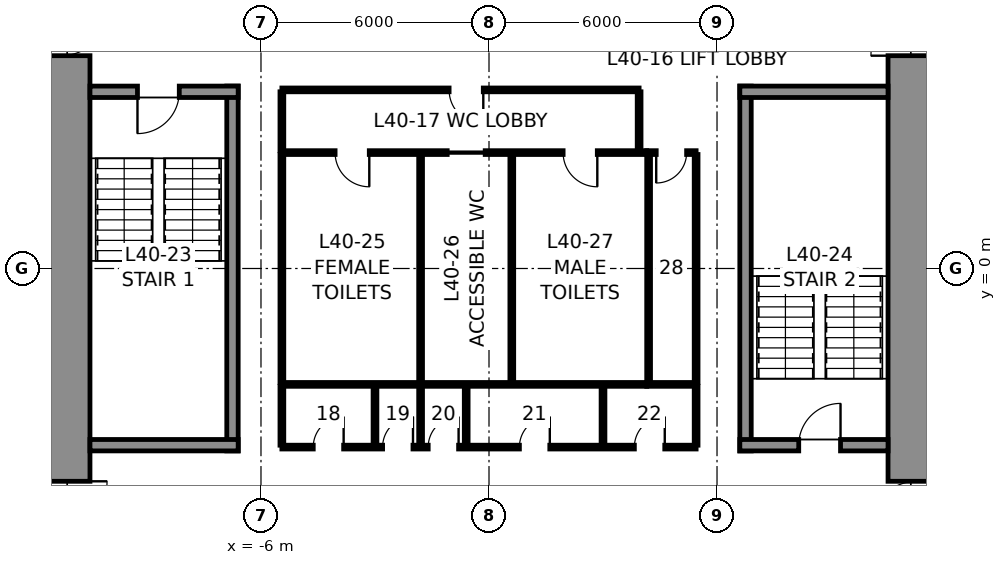
"""IFC4 building model, lengths in metres.
Left out: names, types, materials, properties, quantities, classifications, styles, units other than length and angle.
Written with IfcOpenShell. Run it as: python <this file> out.ifc"""

import sys

from ifc_helpers import new_model, si_unit, direction, frame, frame_2d, origin, place, context, subcontext, project, spatial, rectangle, extrude, element, fill, save


model = new_model("IFC4")
c1 = context("Model", 3, precision=1e-05, world=origin(), true_north=direction((0.0, 1.0)))
c2 = subcontext(c1, "Body", "Model", "MODEL_VIEW")
j1 = project(units=[si_unit("LENGTHUNIT", "METRE"), si_unit("PLANEANGLEUNIT", "RADIAN")], contexts=[c1])
p1 = place(None, origin())
s1 = spatial("IfcSite", under=j1, at=p1, CompositionType="ELEMENT")
p2 = place(p1, origin())
s2 = spatial("IfcBuilding", under=s1, at=p2, CompositionType="ELEMENT")
p3 = place(p2, frame((0.0, 0.0, 187.8)))
s3 = spatial("IfcBuildingStorey", under=s2, at=p3, CompositionType="ELEMENT", Elevation=187.8)
p4 = place(p3, frame((11.25, 10.5, 0.0), z_axis=(0.0, 0.0, 1.0), x_axis=(0.0, -1.0, 0.0)))
e1 = element("IfcWall", 1, at=p4, inside=s3, PredefinedType="SHEAR", context=c2, shape_type="SweptSolid", body=[
    extrude(rectangle(XDim=21.0, YDim=1.5, at=frame_2d((10.5, 0.0))), origin(), (0.0, 0.0, 1.0), 4.0),
])
p5 = place(p4, frame((3.7, 0.0, 0.0)))
e2 = element("IfcOpeningElement", 2, at=p5, cuts=e1, PredefinedType="OPENING", context=c2, shape_type="SweptSolid", body=[
    extrude(rectangle(XDim=1.2, YDim=2.3, at=frame_2d((0.6, 1.15))), frame((0.0, 0.76, 0.0), z_axis=(0.0, -1.0, 0.0), x_axis=(1.0, 0.0, 0.0)), (0.0, 0.0, 1.0), 1.52),
])
p6 = place(p4, frame((16.1, 0.0, 0.0)))
e3 = element("IfcOpeningElement", 3, at=p6, cuts=e1, PredefinedType="OPENING", context=c2, shape_type="SweptSolid", body=[
    extrude(rectangle(XDim=1.2, YDim=2.3, at=frame_2d((0.6, 1.15))), frame((0.0, 0.76, 0.0), z_axis=(0.0, -1.0, 0.0), x_axis=(1.0, 0.0, 0.0)), (0.0, 0.0, 1.0), 1.52),
])
p7 = place(p3, frame((-11.25, -10.5, 0.0), z_axis=(0.0, 0.0, 1.0), x_axis=(0.0, 1.0, 0.0)))
e4 = element("IfcWall", 4, at=p7, inside=s3, PredefinedType="SHEAR", context=c2, shape_type="SweptSolid", body=[
    extrude(rectangle(XDim=21.0, YDim=1.5, at=frame_2d((10.5, 0.0))), origin(), (0.0, 0.0, 1.0), 4.0),
])
p8 = place(p7, frame((16.1, 0.0, 0.0)))
e5 = element("IfcOpeningElement", 5, at=p8, cuts=e4, PredefinedType="OPENING", context=c2, shape_type="SweptSolid", body=[
    extrude(rectangle(XDim=1.2, YDim=2.3, at=frame_2d((0.6, 1.15))), frame((0.0, 0.76, 0.0), z_axis=(0.0, -1.0, 0.0), x_axis=(1.0, 0.0, 0.0)), (0.0, 0.0, 1.0), 1.52),
])
p9 = place(p7, frame((3.7, 0.0, 0.0)))
e6 = element("IfcOpeningElement", 6, at=p9, cuts=e4, PredefinedType="OPENING", context=c2, shape_type="SweptSolid", body=[
    extrude(rectangle(XDim=1.2, YDim=2.3, at=frame_2d((0.6, 1.15))), frame((0.0, 0.76, 0.0), z_axis=(0.0, -1.0, 0.0), x_axis=(1.0, 0.0, 0.0)), (0.0, 0.0, 1.0), 1.52),
])
p10 = place(p3, frame((-6.75, -4.8, 0.0), z_axis=(0.0, 0.0, 1.0), x_axis=(0.0, 1.0, 0.0)))
e7 = element("IfcWall", 7, at=p10, inside=s3, PredefinedType="SOLIDWALL", context=c2, shape_type="SweptSolid", body=[
    extrude(rectangle(XDim=9.6, YDim=0.3, at=frame_2d((4.8, 0.0))), origin(), (0.0, 0.0, 1.0), 3.75),
])
p11 = place(p3, frame((-10.5, 4.65, 0.0), z_axis=(0.0, 0.0, 1.0), x_axis=(1.0, 0.0, 0.0)))
e8 = element("IfcWall", 8, at=p11, inside=s3, PredefinedType="SOLIDWALL", context=c2, shape_type="SweptSolid", body=[
    extrude(rectangle(XDim=3.9, YDim=0.3, at=frame_2d((1.95, 0.0))), origin(), (0.0, 0.0, 1.0), 3.75),
])
p12 = place(p11, frame((1.25, 0.0, 0.0)))
e9 = element("IfcOpeningElement", 9, at=p12, cuts=e8, PredefinedType="OPENING", context=c2, shape_type="SweptSolid", body=[
    extrude(rectangle(XDim=1.1, YDim=2.3, at=frame_2d((0.55, 1.15))), frame((0.0, 0.16, 0.0), z_axis=(0.0, -1.0, 0.0), x_axis=(1.0, 0.0, 0.0)), (0.0, 0.0, 1.0), 0.32),
])
p13 = place(p3, frame((-6.6, -4.65, 0.0), z_axis=(0.0, 0.0, 1.0), x_axis=(-1.0, 0.0, 0.0)))
e10 = element("IfcWall", 10, at=p13, inside=s3, PredefinedType="SOLIDWALL", context=c2, shape_type="SweptSolid", body=[
    extrude(rectangle(XDim=3.9, YDim=0.3, at=frame_2d((1.95, 0.0))), origin(), (0.0, 0.0, 1.0), 3.75),
])
p14 = place(p3, frame((6.75, -4.8, 0.0), z_axis=(0.0, 0.0, 1.0), x_axis=(0.0, 1.0, 0.0)))
e11 = element("IfcWall", 11, at=p14, inside=s3, PredefinedType="SOLIDWALL", context=c2, shape_type="SweptSolid", body=[
    extrude(rectangle(XDim=9.6, YDim=0.3, at=frame_2d((4.8, 0.0))), origin(), (0.0, 0.0, 1.0), 3.75),
])
p15 = place(p3, frame((6.6, 4.65, 0.0), z_axis=(0.0, 0.0, 1.0), x_axis=(1.0, 0.0, 0.0)))
e12 = element("IfcWall", 12, at=p15, inside=s3, PredefinedType="SOLIDWALL", context=c2, shape_type="SweptSolid", body=[
    extrude(rectangle(XDim=3.9, YDim=0.3, at=frame_2d((1.95, 0.0))), origin(), (0.0, 0.0, 1.0), 3.75),
])
p16 = place(p3, frame((10.5, -4.65, 0.0), z_axis=(0.0, 0.0, 1.0), x_axis=(-1.0, 0.0, 0.0)))
e13 = element("IfcWall", 13, at=p16, inside=s3, PredefinedType="SOLIDWALL", context=c2, shape_type="SweptSolid", body=[
    extrude(rectangle(XDim=3.9, YDim=0.3, at=frame_2d((1.95, 0.0))), origin(), (0.0, 0.0, 1.0), 3.75),
])
p17 = place(p16, frame((1.25, 0.0, 0.0)))
e14 = element("IfcOpeningElement", 14, at=p17, cuts=e13, PredefinedType="OPENING", context=c2, shape_type="SweptSolid", body=[
    extrude(rectangle(XDim=1.1, YDim=2.3, at=frame_2d((0.55, 1.15))), frame((0.0, 0.16, 0.0), z_axis=(0.0, -1.0, 0.0), x_axis=(1.0, 0.0, 0.0)), (0.0, 0.0, 1.0), 0.32),
])
p18 = place(p3, frame((-5.45, 3.05, 0.0), z_axis=(0.0, 0.0, 1.0), x_axis=(1.0, 0.0, 0.0)))
e15 = element("IfcWall", 15, at=p18, inside=s3, PredefinedType="PARTITIONING", context=c2, shape_type="SweptSolid", body=[
    extrude(rectangle(XDim=9.6, YDim=0.1, at=frame_2d((4.8, 0.0))), origin(), (0.0, 0.0, 1.0), 3.75),
])
p19 = place(p18, frame((1.4, 0.0, 0.0)))
e16 = element("IfcOpeningElement", 16, at=p19, cuts=e15, PredefinedType="OPENING", context=c2, shape_type="SweptSolid", body=[
    extrude(rectangle(XDim=0.9, YDim=2.3, at=frame_2d((0.45, 1.15))), frame((0.0, 0.06, 0.0), z_axis=(0.0, -1.0, 0.0), x_axis=(1.0, 0.0, 0.0)), (0.0, 0.0, 1.0), 0.12),
])
p20 = place(p18, frame((4.35, 0.0, 0.0)))
e17 = element("IfcOpeningElement", 17, at=p20, cuts=e15, PredefinedType="OPENING", context=c2, shape_type="SweptSolid", body=[
    extrude(rectangle(XDim=1.0, YDim=2.3, at=frame_2d((0.5, 1.15))), frame((0.0, 0.06, 0.0), z_axis=(0.0, -1.0, 0.0), x_axis=(1.0, 0.0, 0.0)), (0.0, 0.0, 1.0), 0.12),
])
p21 = place(p18, frame((7.4, 0.0, 0.0)))
e18 = element("IfcOpeningElement", 18, at=p21, cuts=e15, PredefinedType="OPENING", context=c2, shape_type="SweptSolid", body=[
    extrude(rectangle(XDim=0.9, YDim=2.3, at=frame_2d((0.45, 1.15))), frame((0.0, 0.06, 0.0), z_axis=(0.0, -1.0, 0.0), x_axis=(1.0, 0.0, 0.0)), (0.0, 0.0, 1.0), 0.12),
])
p22 = place(p3, frame((4.15, 3.05, 0.0), z_axis=(0.0, 0.0, 1.0), x_axis=(1.0, 0.0, 0.0)))
e19 = element("IfcWall", 19, at=p22, inside=s3, PredefinedType="PARTITIONING", context=c2, shape_type="SweptSolid", body=[
    extrude(rectangle(XDim=1.3, YDim=0.1, at=frame_2d((0.65, 0.0))), origin(), (0.0, 0.0, 1.0), 3.75),
])
p23 = place(p22, frame((0.25, 0.0, 0.0)))
e20 = element("IfcOpeningElement", 20, at=p23, cuts=e19, PredefinedType="OPENING", context=c2, shape_type="SweptSolid", body=[
    extrude(rectangle(XDim=0.8, YDim=2.3, at=frame_2d((0.4, 1.15))), frame((0.0, 0.06, 0.0), z_axis=(0.0, -1.0, 0.0), x_axis=(1.0, 0.0, 0.0)), (0.0, 0.0, 1.0), 0.12),
])
p24 = place(p3, frame((4.15, -3.05, 0.0), z_axis=(0.0, 0.0, 1.0), x_axis=(-1.0, 0.0, 0.0)))
e21 = element("IfcWall", 21, at=p24, inside=s3, PredefinedType="PARTITIONING", context=c2, shape_type="SweptSolid", body=[
    extrude(rectangle(XDim=9.6, YDim=0.1, at=frame_2d((4.8, 0.0))), origin(), (0.0, 0.0, 1.0), 3.75),
])
p25 = place(p3, frame((5.45, -3.05, 0.0), z_axis=(0.0, 0.0, 1.0), x_axis=(-1.0, 0.0, 0.0)))
e22 = element("IfcWall", 22, at=p25, inside=s3, PredefinedType="PARTITIONING", context=c2, shape_type="SweptSolid", body=[
    extrude(rectangle(XDim=1.3, YDim=0.1, at=frame_2d((0.65, 0.0))), origin(), (0.0, 0.0, 1.0), 3.75),
])
for number, where, z_axis, x_axis in (
    (23, (5.45, 3.0, 0.0), (0.0, 0.0, 1.0), (0.0, -1.0, 0.0)),
    (24, (-5.45, -3.0, 0.0), (0.0, 0.0, 1.0), (0.0, 1.0, 0.0)),
    (25, (-1.8, -3.0, 0.0), (0.0, 0.0, 1.0), (0.0, 1.0, 0.0)),
    (26, (0.6, -3.0, 0.0), (0.0, 0.0, 1.0), (0.0, 1.0, 0.0)),
    (27, (4.2, -3.0, 0.0), (0.0, 0.0, 1.0), (0.0, 1.0, 0.0)),
):
    element("IfcWall", number, at=place(p3, frame(where, z_axis=z_axis, x_axis=x_axis)), inside=s3, PredefinedType="PARTITIONING", context=c2, shape_type="SweptSolid", body=[
        extrude(rectangle(XDim=6.0, YDim=0.1, at=frame_2d((3.0, 0.0))), origin(), (0.0, 0.0, 1.0), 3.75),
    ])
p26 = place(p3, frame((-5.45, 4.7, 0.0), z_axis=(0.0, 0.0, 1.0), x_axis=(1.0, 0.0, 0.0)))
e28 = element("IfcWall", 28, at=p26, inside=s3, PredefinedType="PARTITIONING", context=c2, shape_type="SweptSolid", body=[
    extrude(rectangle(XDim=9.4, YDim=0.1, at=frame_2d((4.7, 0.0))), origin(), (0.0, 0.0, 1.0), 3.75),
])
p27 = place(p26, frame((4.4, 0.0, 0.0)))
e29 = element("IfcOpeningElement", 29, at=p27, cuts=e28, PredefinedType="OPENING", context=c2, shape_type="SweptSolid", body=[
    extrude(rectangle(XDim=0.9, YDim=2.3, at=frame_2d((0.45, 1.15))), frame((0.0, 0.06, 0.0), z_axis=(0.0, -1.0, 0.0), x_axis=(1.0, 0.0, 0.0)), (0.0, 0.0, 1.0), 0.12),
])
for number, where, z_axis, x_axis in (
    (30, (-5.45, 3.1, 0.0), (0.0, 0.0, 1.0), (0.0, 1.0, 0.0)),
    (31, (3.95, 3.1, 0.0), (0.0, 0.0, 1.0), (0.0, 1.0, 0.0)),
):
    element("IfcWall", number, at=place(p3, frame(where, z_axis=z_axis, x_axis=x_axis)), inside=s3, PredefinedType="PARTITIONING", context=c2, shape_type="SweptSolid", body=[
        extrude(rectangle(XDim=1.55, YDim=0.1, at=frame_2d((0.775, 0.0))), origin(), (0.0, 0.0, 1.0), 3.75),
    ])
p28 = place(p3, frame((5.45, -4.7, 0.0), z_axis=(0.0, 0.0, 1.0), x_axis=(-1.0, 0.0, 0.0)))
e32 = element("IfcWall", 32, at=p28, inside=s3, PredefinedType="PARTITIONING", context=c2, shape_type="SweptSolid", body=[
    extrude(rectangle(XDim=10.9, YDim=0.1, at=frame_2d((5.45, 0.0))), origin(), (0.0, 0.0, 1.0), 3.75),
])
p29 = place(p28, frame((9.275, 0.0, 0.0)))
e33 = element("IfcOpeningElement", 33, at=p29, cuts=e32, PredefinedType="OPENING", context=c2, shape_type="SweptSolid", body=[
    extrude(rectangle(XDim=0.8, YDim=2.3, at=frame_2d((0.4, 1.15))), frame((0.0, 0.06, 0.0), z_axis=(0.0, -1.0, 0.0), x_axis=(1.0, 0.0, 0.0)), (0.0, 0.0, 1.0), 0.12),
])
p30 = place(p28, frame((7.45, 0.0, 0.0)))
e34 = element("IfcOpeningElement", 34, at=p30, cuts=e32, PredefinedType="OPENING", context=c2, shape_type="SweptSolid", body=[
    extrude(rectangle(XDim=0.8, YDim=2.3, at=frame_2d((0.4, 1.15))), frame((0.0, 0.06, 0.0), z_axis=(0.0, -1.0, 0.0), x_axis=(1.0, 0.0, 0.0)), (0.0, 0.0, 1.0), 0.12),
])
p31 = place(p28, frame((6.25, 0.0, 0.0)))
e35 = element("IfcOpeningElement", 35, at=p31, cuts=e32, PredefinedType="OPENING", context=c2, shape_type="SweptSolid", body=[
    extrude(rectangle(XDim=0.8, YDim=2.3, at=frame_2d((0.4, 1.15))), frame((0.0, 0.06, 0.0), z_axis=(0.0, -1.0, 0.0), x_axis=(1.0, 0.0, 0.0)), (0.0, 0.0, 1.0), 0.12),
])
p32 = place(p28, frame((3.85, 0.0, 0.0)))
e36 = element("IfcOpeningElement", 36, at=p32, cuts=e32, PredefinedType="OPENING", context=c2, shape_type="SweptSolid", body=[
    extrude(rectangle(XDim=0.8, YDim=2.3, at=frame_2d((0.4, 1.15))), frame((0.0, 0.06, 0.0), z_axis=(0.0, -1.0, 0.0), x_axis=(1.0, 0.0, 0.0)), (0.0, 0.0, 1.0), 0.12),
])
p33 = place(p28, frame((0.825, 0.0, 0.0)))
e37 = element("IfcOpeningElement", 37, at=p33, cuts=e32, PredefinedType="OPENING", context=c2, shape_type="SweptSolid", body=[
    extrude(rectangle(XDim=0.8, YDim=2.3, at=frame_2d((0.4, 1.15))), frame((0.0, 0.06, 0.0), z_axis=(0.0, -1.0, 0.0), x_axis=(1.0, 0.0, 0.0)), (0.0, 0.0, 1.0), 0.12),
])
for number, where, z_axis, x_axis in (
    (38, (-5.45, -3.1, 0.0), (0.0, 0.0, 1.0), (0.0, -1.0, 0.0)),
    (39, (5.45, -3.1, 0.0), (0.0, 0.0, 1.0), (0.0, -1.0, 0.0)),
    (40, (-3.0, -3.1, 0.0), (0.0, 0.0, 1.0), (0.0, -1.0, 0.0)),
    (41, (-1.8, -3.1, 0.0), (0.0, 0.0, 1.0), (0.0, -1.0, 0.0)),
    (42, (-0.6, -3.1, 0.0), (0.0, 0.0, 1.0), (0.0, -1.0, 0.0)),
    (43, (3.0, -3.1, 0.0), (0.0, 0.0, 1.0), (0.0, -1.0, 0.0)),
):
    element("IfcWall", number, at=place(p3, frame(where, z_axis=z_axis, x_axis=x_axis)), inside=s3, PredefinedType="PARTITIONING", context=c2, shape_type="SweptSolid", body=[
        extrude(rectangle(XDim=1.55, YDim=0.1, at=frame_2d((0.775, 0.0))), origin(), (0.0, 0.0, 1.0), 3.75),
    ])
p34 = place(p12, frame((1.1, 0.0, 0.0), z_axis=(0.0, 0.0, 1.0), x_axis=(-1.0, 0.0, 0.0)))
e44 = element("IfcDoor", 44, at=p34, inside=s3, OperationType="SINGLE_SWING_RIGHT", PredefinedType="DOOR", context=c2, shape_type="SweptSolid", body=[
    extrude(rectangle(XDim=1.1, YDim=2.3, at=frame_2d((0.55, 1.15))), frame((0.0, 0.025, 0.0), z_axis=(0.0, -1.0, 0.0), x_axis=(1.0, 0.0, 0.0)), (0.0, 0.0, 1.0), 0.05),
])
fill(e9, e44)
p35 = place(p17, frame((1.1, 0.0, 0.0), z_axis=(0.0, 0.0, 1.0), x_axis=(-1.0, 0.0, 0.0)))
e45 = element("IfcDoor", 45, at=p35, inside=s3, OperationType="SINGLE_SWING_RIGHT", PredefinedType="DOOR", context=c2, shape_type="SweptSolid", body=[
    extrude(rectangle(XDim=1.1, YDim=2.3, at=frame_2d((0.55, 1.15))), frame((0.0, 0.025, 0.0), z_axis=(0.0, -1.0, 0.0), x_axis=(1.0, 0.0, 0.0)), (0.0, 0.0, 1.0), 0.05),
])
fill(e14, e45)
p36 = place(p19, frame((0.9, 0.0, 0.0), z_axis=(0.0, 0.0, 1.0), x_axis=(-1.0, 0.0, 0.0)))
e46 = element("IfcDoor", 46, at=p36, inside=s3, OperationType="SINGLE_SWING_LEFT", PredefinedType="DOOR", context=c2, shape_type="SweptSolid", body=[
    extrude(rectangle(XDim=0.9, YDim=2.3, at=frame_2d((0.45, 1.15))), frame((0.0, 0.025, 0.0), z_axis=(0.0, -1.0, 0.0), x_axis=(1.0, 0.0, 0.0)), (0.0, 0.0, 1.0), 0.05),
])
fill(e16, e46)
p37 = place(p20, frame((1.0, 0.0, 0.0), z_axis=(0.0, 0.0, 1.0), x_axis=(-1.0, 0.0, 0.0)))
e47 = element("IfcDoor", 47, at=p37, inside=s3, OperationType="SLIDING_TO_LEFT", PredefinedType="DOOR", context=c2, shape_type="SweptSolid", body=[
    extrude(rectangle(XDim=1.0, YDim=2.3, at=frame_2d((0.5, 1.15))), frame((0.0, 0.025, 0.0), z_axis=(0.0, -1.0, 0.0), x_axis=(1.0, 0.0, 0.0)), (0.0, 0.0, 1.0), 0.05),
])
fill(e17, e47)
p38 = place(p21, frame((0.9, 0.0, 0.0), z_axis=(0.0, 0.0, 1.0), x_axis=(-1.0, 0.0, 0.0)))
e48 = element("IfcDoor", 48, at=p38, inside=s3, OperationType="SINGLE_SWING_LEFT", PredefinedType="DOOR", context=c2, shape_type="SweptSolid", body=[
    extrude(rectangle(XDim=0.9, YDim=2.3, at=frame_2d((0.45, 1.15))), frame((0.0, 0.025, 0.0), z_axis=(0.0, -1.0, 0.0), x_axis=(1.0, 0.0, 0.0)), (0.0, 0.0, 1.0), 0.05),
])
fill(e18, e48)
p39 = place(p23, frame((0.8, 0.0, 0.0), z_axis=(0.0, 0.0, 1.0), x_axis=(-1.0, 0.0, 0.0)))
e49 = element("IfcDoor", 49, at=p39, inside=s3, OperationType="SINGLE_SWING_RIGHT", PredefinedType="DOOR", context=c2, shape_type="SweptSolid", body=[
    extrude(rectangle(XDim=0.8, YDim=2.3, at=frame_2d((0.4, 1.15))), frame((0.0, 0.025, 0.0), z_axis=(0.0, -1.0, 0.0), x_axis=(1.0, 0.0, 0.0)), (0.0, 0.0, 1.0), 0.05),
])
fill(e20, e49)
p40 = place(p27, frame((0.9, 0.0, 0.0), z_axis=(0.0, 0.0, 1.0), x_axis=(-1.0, 0.0, 0.0)))
e50 = element("IfcDoor", 50, at=p40, inside=s3, OperationType="SINGLE_SWING_LEFT", PredefinedType="DOOR", context=c2, shape_type="SweptSolid", body=[
    extrude(rectangle(XDim=0.9, YDim=2.3, at=frame_2d((0.45, 1.15))), frame((0.0, 0.025, 0.0), z_axis=(0.0, -1.0, 0.0), x_axis=(1.0, 0.0, 0.0)), (0.0, 0.0, 1.0), 0.05),
])
fill(e29, e50)
p41 = place(p29, frame((0.8, 0.0, 0.0), z_axis=(0.0, 0.0, 1.0), x_axis=(-1.0, 0.0, 0.0)))
e51 = element("IfcDoor", 51, at=p41, inside=s3, OperationType="SINGLE_SWING_RIGHT", PredefinedType="DOOR", context=c2, shape_type="SweptSolid", body=[
    extrude(rectangle(XDim=0.8, YDim=2.3, at=frame_2d((0.4, 1.15))), frame((0.0, 0.025, 0.0), z_axis=(0.0, -1.0, 0.0), x_axis=(1.0, 0.0, 0.0)), (0.0, 0.0, 1.0), 0.05),
])
fill(e33, e51)
p42 = place(p30, frame((0.8, 0.0, 0.0), z_axis=(0.0, 0.0, 1.0), x_axis=(-1.0, 0.0, 0.0)))
e52 = element("IfcDoor", 52, at=p42, inside=s3, OperationType="SINGLE_SWING_RIGHT", PredefinedType="DOOR", context=c2, shape_type="SweptSolid", body=[
    extrude(rectangle(XDim=0.8, YDim=2.3, at=frame_2d((0.4, 1.15))), frame((0.0, 0.025, 0.0), z_axis=(0.0, -1.0, 0.0), x_axis=(1.0, 0.0, 0.0)), (0.0, 0.0, 1.0), 0.05),
])
fill(e34, e52)
p43 = place(p31, frame((0.8, 0.0, 0.0), z_axis=(0.0, 0.0, 1.0), x_axis=(-1.0, 0.0, 0.0)))
e53 = element("IfcDoor", 53, at=p43, inside=s3, OperationType="SINGLE_SWING_RIGHT", PredefinedType="DOOR", context=c2, shape_type="SweptSolid", body=[
    extrude(rectangle(XDim=0.8, YDim=2.3, at=frame_2d((0.4, 1.15))), frame((0.0, 0.025, 0.0), z_axis=(0.0, -1.0, 0.0), x_axis=(1.0, 0.0, 0.0)), (0.0, 0.0, 1.0), 0.05),
])
fill(e35, e53)
p44 = place(p32, frame((0.8, 0.0, 0.0), z_axis=(0.0, 0.0, 1.0), x_axis=(-1.0, 0.0, 0.0)))
e54 = element("IfcDoor", 54, at=p44, inside=s3, OperationType="SINGLE_SWING_RIGHT", PredefinedType="DOOR", context=c2, shape_type="SweptSolid", body=[
    extrude(rectangle(XDim=0.8, YDim=2.3, at=frame_2d((0.4, 1.15))), frame((0.0, 0.025, 0.0), z_axis=(0.0, -1.0, 0.0), x_axis=(1.0, 0.0, 0.0)), (0.0, 0.0, 1.0), 0.05),
])
fill(e36, e54)
p45 = place(p33, frame((0.8, 0.0, 0.0), z_axis=(0.0, 0.0, 1.0), x_axis=(-1.0, 0.0, 0.0)))
e55 = element("IfcDoor", 55, at=p45, inside=s3, OperationType="SINGLE_SWING_RIGHT", PredefinedType="DOOR", context=c2, shape_type="SweptSolid", body=[
    extrude(rectangle(XDim=0.8, YDim=2.3, at=frame_2d((0.4, 1.15))), frame((0.0, 0.025, 0.0), z_axis=(0.0, -1.0, 0.0), x_axis=(1.0, 0.0, 0.0)), (0.0, 0.0, 1.0), 0.05),
])
fill(e37, e55)
p46 = place(p8, frame((1.2, 0.0, 0.0), z_axis=(0.0, 0.0, 1.0), x_axis=(-1.0, 0.0, 0.0)))
e56 = element("IfcDoor", 56, at=p46, inside=s3, OperationType="SINGLE_SWING_LEFT", PredefinedType="DOOR", context=c2, shape_type="SweptSolid", body=[
    extrude(rectangle(XDim=1.2, YDim=2.3, at=frame_2d((0.6, 1.15))), frame((0.0, 0.025, 0.0), z_axis=(0.0, -1.0, 0.0), x_axis=(1.0, 0.0, 0.0)), (0.0, 0.0, 1.0), 0.05),
])
fill(e5, e56)
p47 = place(p9, frame((1.2, 0.0, 0.0), z_axis=(0.0, 0.0, 1.0), x_axis=(-1.0, 0.0, 0.0)))
e57 = element("IfcDoor", 57, at=p47, inside=s3, OperationType="SINGLE_SWING_LEFT", PredefinedType="DOOR", context=c2, shape_type="SweptSolid", body=[
    extrude(rectangle(XDim=1.2, YDim=2.3, at=frame_2d((0.6, 1.15))), frame((0.0, 0.025, 0.0), z_axis=(0.0, -1.0, 0.0), x_axis=(1.0, 0.0, 0.0)), (0.0, 0.0, 1.0), 0.05),
])
fill(e6, e57)
p48 = place(p5, frame((1.2, 0.0, 0.0), z_axis=(0.0, 0.0, 1.0), x_axis=(-1.0, 0.0, 0.0)))
e58 = element("IfcDoor", 58, at=p48, inside=s3, OperationType="SINGLE_SWING_LEFT", PredefinedType="DOOR", context=c2, shape_type="SweptSolid", body=[
    extrude(rectangle(XDim=1.2, YDim=2.3, at=frame_2d((0.6, 1.15))), frame((0.0, 0.025, 0.0), z_axis=(0.0, -1.0, 0.0), x_axis=(1.0, 0.0, 0.0)), (0.0, 0.0, 1.0), 0.05),
])
fill(e2, e58)
p49 = place(p6, frame((1.2, 0.0, 0.0), z_axis=(0.0, 0.0, 1.0), x_axis=(-1.0, 0.0, 0.0)))
e59 = element("IfcDoor", 59, at=p49, inside=s3, OperationType="SINGLE_SWING_LEFT", PredefinedType="DOOR", context=c2, shape_type="SweptSolid", body=[
    extrude(rectangle(XDim=1.2, YDim=2.3, at=frame_2d((0.6, 1.15))), frame((0.0, 0.025, 0.0), z_axis=(0.0, -1.0, 0.0), x_axis=(1.0, 0.0, 0.0)), (0.0, 0.0, 1.0), 0.05),
])
fill(e3, e59)
save(model, sys.argv[1])
